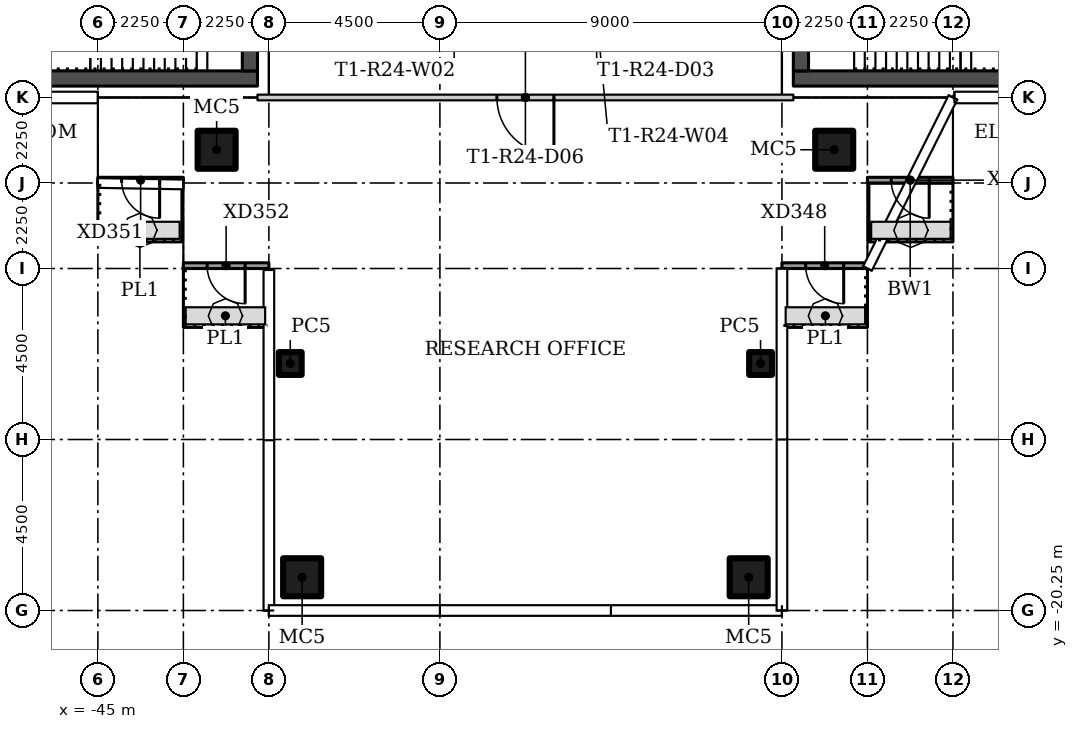
"""IFC4 building model, lengths in metres.
Left out: names, types, materials, properties, quantities, classifications, styles, units other than length and angle.
Written with IfcOpenShell. Run it as: python <this file> out.ifc"""

import sys

from ifc_helpers import new_model, si_unit, direction, frame, frame_2d, origin, origin_2d, place, context, subcontext, project, spatial, rectangle, hollow_rectangle, extrude, element, fill, save


model = new_model("IFC4")
c1 = context("Model", 3, precision=1e-05, world=origin(), true_north=direction((0.0, 1.0)))
c2 = subcontext(c1, "Body", "Model", "MODEL_VIEW")
j1 = project(units=[si_unit("LENGTHUNIT", "METRE"), si_unit("PLANEANGLEUNIT", "RADIAN")], contexts=[c1])
p1 = place(None, origin())
s1 = spatial("IfcSite", under=j1, at=p1, CompositionType="ELEMENT")
p2 = place(p1, origin())
s2 = spatial("IfcBuilding", under=s1, at=p2, CompositionType="ELEMENT")
p3 = place(p2, frame((0.0, 0.0, 217.8)))
s3 = spatial("IfcBuildingStorey", under=s2, at=p3, CompositionType="ELEMENT", Elevation=217.8)
for number, where in (
    (1, (-25.625, -8.125, 0.0)),
    (2, (-41.875, -8.125, 0.0)),
):
    element("IfcColumn", number, at=place(p3, frame(where)), inside=s3, PredefinedType="COLUMN", context=c2, shape_type="SweptSolid", body=[
        extrude(hollow_rectangle(XDim=1.0, YDim=1.0, WallThickness=0.04, at=origin_2d()), origin(), (0.0, 0.0, 1.0), 3.55),
    ])
p4 = place(p3, frame((-39.938, -13.75, 0.0)))
e3 = element("IfcColumn", 3, at=p4, inside=s3, PredefinedType="COLUMN", context=c2, shape_type="SweptSolid", body=[
    extrude(hollow_rectangle(XDim=0.6, YDim=0.6, WallThickness=0.02, at=origin_2d()), origin(), (0.0, 0.0, 1.0), 3.55),
])
p5 = place(p3, frame((-39.625, -19.375, 0.0)))
e4 = element("IfcColumn", 4, at=p5, inside=s3, PredefinedType="COLUMN", context=c2, shape_type="SweptSolid", body=[
    extrude(hollow_rectangle(XDim=1.0, YDim=1.0, WallThickness=0.04, at=origin_2d()), origin(), (0.0, 0.0, 1.0), 3.55),
])
p6 = place(p3, frame((-27.562, -13.75, 0.0)))
e5 = element("IfcColumn", 5, at=p6, inside=s3, PredefinedType="COLUMN", context=c2, shape_type="SweptSolid", body=[
    extrude(hollow_rectangle(XDim=0.6, YDim=0.6, WallThickness=0.02, at=origin_2d()), origin(), (0.0, 0.0, 1.0), 3.55),
])
p7 = place(p3, frame((-27.875, -19.375, 0.0)))
e6 = element("IfcColumn", 6, at=p7, inside=s3, PredefinedType="COLUMN", context=c2, shape_type="SweptSolid", body=[
    extrude(hollow_rectangle(XDim=1.0, YDim=1.0, WallThickness=0.04, at=origin_2d()), origin(), (0.0, 0.0, 1.0), 3.55),
])
p8 = place(p3, frame((-26.7, -6.75, 0.0), z_axis=(0.0, 0.0, 1.0), x_axis=(-1.0, 0.0, 0.0)))
e7 = element("IfcWall", 7, at=p8, inside=s3, PredefinedType="PARTITIONING", context=c2, shape_type="SweptSolid", body=[
    extrude(rectangle(XDim=14.1, YDim=0.15, at=frame_2d((7.05, 0.0))), origin(), (0.0, 0.0, 1.0), 3.55),
])
p9 = place(p8, frame((6.3, 0.0, 0.0)))
e8 = element("IfcOpeningElement", 8, at=p9, cuts=e7, PredefinedType="OPENING", context=c2, shape_type="SweptSolid", body=[
    extrude(rectangle(XDim=1.5, YDim=2.1, at=frame_2d((0.75, 1.05))), frame((0.0, 0.085, 0.0), z_axis=(0.0, -1.0, 0.0), x_axis=(1.0, 0.0, 0.0)), (0.0, 0.0, 1.0), 0.17),
])
p10 = place(p3, frame((-22.5, -8.925, 0.0), z_axis=(0.0, 0.0, 1.0), x_axis=(-1.0, 0.0, 0.0)))
e9 = element("IfcWall", 9, at=p10, inside=s3, PredefinedType="SOLIDWALL", context=c2, shape_type="SweptSolid", body=[
    extrude(rectangle(XDim=2.25, YDim=0.15, at=frame_2d((1.125, 0.0))), origin(), (0.0, 0.0, 1.0), 3.45),
])
p11 = place(p10, frame((0.625, 0.0, 0.0)))
e10 = element("IfcOpeningElement", 10, at=p11, cuts=e9, PredefinedType="OPENING", context=c2, shape_type="SweptSolid", body=[
    extrude(rectangle(XDim=1.0, YDim=2.4, at=frame_2d((0.5, 1.2))), frame((0.0, 0.085, 0.0), z_axis=(0.0, -1.0, 0.0), x_axis=(1.0, 0.0, 0.0)), (0.0, 0.0, 1.0), 0.17),
])
p12 = place(p3, frame((-24.75, -11.175, 0.0), z_axis=(0.0, 0.0, 1.0), x_axis=(-1.0, 0.0, 0.0)))
e11 = element("IfcWall", 11, at=p12, inside=s3, PredefinedType="SOLIDWALL", context=c2, shape_type="SweptSolid", body=[
    extrude(rectangle(XDim=2.25, YDim=0.15, at=frame_2d((1.125, 0.0))), origin(), (0.0, 0.0, 1.0), 3.45),
])
p13 = place(p12, frame((0.625, 0.0, 0.0)))
e12 = element("IfcOpeningElement", 12, at=p13, cuts=e11, PredefinedType="OPENING", context=c2, shape_type="SweptSolid", body=[
    extrude(rectangle(XDim=1.0, YDim=2.4, at=frame_2d((0.5, 1.2))), frame((0.0, 0.085, 0.0), z_axis=(0.0, -1.0, 0.0), x_axis=(1.0, 0.0, 0.0)), (0.0, 0.0, 1.0), 0.17),
])
p14 = place(p3, frame((-42.75, -8.925, 0.0), z_axis=(0.0, 0.0, 1.0), x_axis=(-1.0, 0.0, 0.0)))
e13 = element("IfcWall", 13, at=p14, inside=s3, PredefinedType="SOLIDWALL", context=c2, shape_type="SweptSolid", body=[
    extrude(rectangle(XDim=2.25, YDim=0.15, at=frame_2d((1.125, 0.0))), origin(), (0.0, 0.0, 1.0), 3.45),
])
p15 = place(p14, frame((0.625, 0.0, 0.0)))
e14 = element("IfcOpeningElement", 14, at=p15, cuts=e13, PredefinedType="OPENING", context=c2, shape_type="SweptSolid", body=[
    extrude(rectangle(XDim=1.0, YDim=2.4, at=frame_2d((0.5, 1.2))), frame((0.0, 0.085, 0.0), z_axis=(0.0, -1.0, 0.0), x_axis=(1.0, 0.0, 0.0)), (0.0, 0.0, 1.0), 0.17),
])
p16 = place(p3, frame((-40.5, -11.175, 0.0), z_axis=(0.0, 0.0, 1.0), x_axis=(-1.0, 0.0, 0.0)))
e15 = element("IfcWall", 15, at=p16, inside=s3, PredefinedType="SOLIDWALL", context=c2, shape_type="SweptSolid", body=[
    extrude(rectangle(XDim=2.25, YDim=0.15, at=frame_2d((1.125, 0.0))), origin(), (0.0, 0.0, 1.0), 3.45),
])
p17 = place(p16, frame((0.625, 0.0, 0.0)))
e16 = element("IfcOpeningElement", 16, at=p17, cuts=e15, PredefinedType="OPENING", context=c2, shape_type="SweptSolid", body=[
    extrude(rectangle(XDim=1.0, YDim=2.4, at=frame_2d((0.5, 1.2))), frame((0.0, 0.085, 0.0), z_axis=(0.0, -1.0, 0.0), x_axis=(1.0, 0.0, 0.0)), (0.0, 0.0, 1.0), 0.17),
])
p18 = place(p3, frame((-26.7, -6.25, 0.0)))
e17 = element("IfcWall", 17, at=p18, inside=s3, PredefinedType="SHEAR", context=c2, shape_type="SweptSolid", body=[
    extrude(rectangle(XDim=12.9, YDim=0.4, at=frame_2d((6.45, 0.0))), origin(), (0.0, 0.0, 1.0), 3.55),
])
p19 = place(p3, frame((-26.5, 6.05, 0.0), z_axis=(0.0, 0.0, 1.0), x_axis=(0.0, -1.0, 0.0)))
e18 = element("IfcWall", 18, at=p19, inside=s3, PredefinedType="SHEAR", context=c2, shape_type="SweptSolid", body=[
    extrude(rectangle(XDim=12.1, YDim=0.4, at=frame_2d((6.05, 0.0))), origin(), (0.0, 0.0, 1.0), 3.55),
])
p20 = place(p19, frame((3.9, 0.0, 0.0)))
e19 = element("IfcOpeningElement", 19, at=p20, cuts=e18, PredefinedType="OPENING", context=c2, shape_type="SweptSolid", body=[
    extrude(rectangle(XDim=1.8, YDim=2.4, at=frame_2d((0.9, 1.2))), frame((0.0, 0.21, 0.0), z_axis=(0.0, -1.0, 0.0), x_axis=(1.0, 0.0, 0.0)), (0.0, 0.0, 1.0), 0.42),
])
p21 = place(p3, frame((-40.8, -6.25, 0.0), z_axis=(0.0, 0.0, 1.0), x_axis=(-1.0, 0.0, 0.0)))
e20 = element("IfcWall", 20, at=p21, inside=s3, PredefinedType="SHEAR", context=c2, shape_type="SweptSolid", body=[
    extrude(rectangle(XDim=12.9, YDim=0.4, at=frame_2d((6.45, 0.0))), origin(), (0.0, 0.0, 1.0), 3.55),
])
p22 = place(p3, frame((-41.0, -6.05, 0.0), z_axis=(0.0, 0.0, 1.0), x_axis=(0.0, 1.0, 0.0)))
e21 = element("IfcWall", 21, at=p22, inside=s3, PredefinedType="SHEAR", context=c2, shape_type="SweptSolid", body=[
    extrude(rectangle(XDim=12.1, YDim=0.4, at=frame_2d((6.05, 0.0))), origin(), (0.0, 0.0, 1.0), 3.55),
])
p23 = place(p22, frame((6.4, 0.0, 0.0)))
e22 = element("IfcOpeningElement", 22, at=p23, cuts=e21, PredefinedType="OPENING", context=c2, shape_type="SweptSolid", body=[
    extrude(rectangle(XDim=1.8, YDim=2.4, at=frame_2d((0.9, 1.2))), frame((0.0, 0.21, 0.0), z_axis=(0.0, -1.0, 0.0), x_axis=(1.0, 0.0, 0.0)), (0.0, 0.0, 1.0), 0.42),
])
p24 = place(p9, origin())
e23 = element("IfcDoor", 23, at=p24, inside=s3, OperationType="DOUBLE_DOOR_SINGLE_SWING", PredefinedType="DOOR", context=c2, shape_type="SweptSolid", body=[
    extrude(rectangle(XDim=1.5, YDim=2.1, at=frame_2d((0.75, 1.05))), frame((0.0, 0.025, 0.0), z_axis=(0.0, -1.0, 0.0), x_axis=(1.0, 0.0, 0.0)), (0.0, 0.0, 1.0), 0.05),
])
fill(e8, e23)
p25 = place(p11, origin())
e24 = element("IfcDoor", 24, at=p25, inside=s3, OperationType="SINGLE_SWING_RIGHT", PredefinedType="DOOR", context=c2, shape_type="SweptSolid", body=[
    extrude(rectangle(XDim=1.0, YDim=2.4, at=frame_2d((0.5, 1.2))), frame((0.0, 0.025, 0.0), z_axis=(0.0, -1.0, 0.0), x_axis=(1.0, 0.0, 0.0)), (0.0, 0.0, 1.0), 0.05),
])
fill(e10, e24)
p26 = place(p13, origin())
e25 = element("IfcDoor", 25, at=p26, inside=s3, OperationType="SINGLE_SWING_LEFT", PredefinedType="DOOR", context=c2, shape_type="SweptSolid", body=[
    extrude(rectangle(XDim=1.0, YDim=2.4, at=frame_2d((0.5, 1.2))), frame((0.0, 0.025, 0.0), z_axis=(0.0, -1.0, 0.0), x_axis=(1.0, 0.0, 0.0)), (0.0, 0.0, 1.0), 0.05),
])
fill(e12, e25)
p27 = place(p15, origin())
e26 = element("IfcDoor", 26, at=p27, inside=s3, OperationType="SINGLE_SWING_LEFT", PredefinedType="DOOR", context=c2, shape_type="SweptSolid", body=[
    extrude(rectangle(XDim=1.0, YDim=2.4, at=frame_2d((0.5, 1.2))), frame((0.0, 0.025, 0.0), z_axis=(0.0, -1.0, 0.0), x_axis=(1.0, 0.0, 0.0)), (0.0, 0.0, 1.0), 0.05),
])
fill(e14, e26)
p28 = place(p17, origin())
e27 = element("IfcDoor", 27, at=p28, inside=s3, OperationType="SINGLE_SWING_RIGHT", PredefinedType="DOOR", context=c2, shape_type="SweptSolid", body=[
    extrude(rectangle(XDim=1.0, YDim=2.4, at=frame_2d((0.5, 1.2))), frame((0.0, 0.025, 0.0), z_axis=(0.0, -1.0, 0.0), x_axis=(1.0, 0.0, 0.0)), (0.0, 0.0, 1.0), 0.05),
])
fill(e16, e27)
save(model, sys.argv[1])
